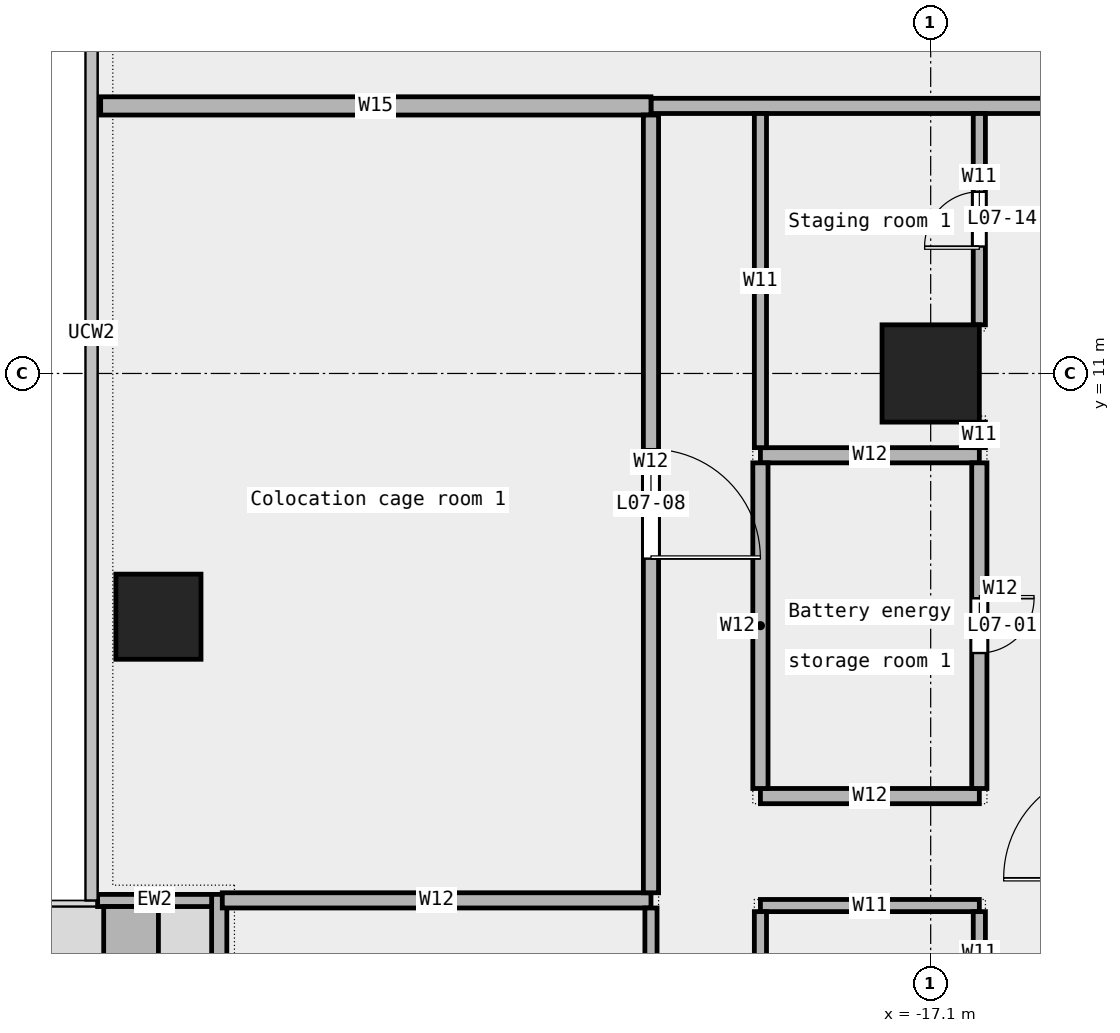
"""IFC4 building model, lengths in metres.
Left out: names, types, materials, properties, quantities, classifications, styles, units other than length and angle.
Written with IfcOpenShell. Run it as: python <this file> out.ifc"""

import sys

from ifc_helpers import new_model, si_unit, direction, frame, frame_2d, origin, origin_2d, place, context, subcontext, project, spatial, rectangle, extrude, element, fill, save


model = new_model("IFC4")
c1 = context("Model", 3, precision=1e-05, world=origin(), true_north=direction((0.0, 1.0)))
c2 = subcontext(c1, "Body", "Model", "MODEL_VIEW")
j1 = project(units=[si_unit("LENGTHUNIT", "METRE"), si_unit("PLANEANGLEUNIT", "RADIAN")], contexts=[c1])
p1 = place(None, origin())
s1 = spatial("IfcSite", under=j1, at=p1, CompositionType="ELEMENT")
p2 = place(p1, origin())
s2 = spatial("IfcBuilding", under=s1, at=p2, CompositionType="ELEMENT")
p3 = place(p2, frame((0.0, 0.0, 40.6)))
s3 = spatial("IfcBuildingStorey", under=s2, at=p3, CompositionType="ELEMENT", Elevation=40.6)
p4 = place(p3, frame((-29.8, 7.0, 0.0), z_axis=(0.0, 0.0, 1.0), x_axis=(1.0, 0.0, 0.0)))
e1 = element("IfcColumn", 1, at=p4, inside=s3, PredefinedType="COLUMN", context=c2, shape_type="SweptSolid", body=[
    extrude(rectangle(XDim=1.4, YDim=1.4, at=origin_2d()), origin(), (0.0, 0.0, 1.0), 4.35),
])
p5 = place(p3, frame((-17.1, 11.0, 0.0), z_axis=(0.0, 0.0, 1.0), x_axis=(1.0, 0.0, 0.0)))
e2 = element("IfcColumn", 2, at=p5, inside=s3, PredefinedType="COLUMN", context=c2, shape_type="SweptSolid", body=[
    extrude(rectangle(XDim=1.6, YDim=1.6, at=origin_2d()), origin(), (0.0, 0.0, 1.0), 4.35),
])
p6 = place(p3, frame((-28.8, 2.433, 0.0), z_axis=(0.0, 0.0, 1.0), x_axis=(0.0, -1.0, 0.0)))
e3 = element("IfcWall", 3, at=p6, inside=s3, PredefinedType="STANDARD", context=c2, shape_type="SweptSolid", body=[
    extrude(rectangle(XDim=14.2, YDim=0.25, at=frame_2d((7.1, 0.0))), origin(), (0.0, 0.0, 1.0), 4.35),
])
p7 = place(p6, frame((1.75, 0.0, 0.45)))
e4 = element("IfcOpeningElement", 4, at=p7, cuts=e3, PredefinedType="OPENING", context=c2, shape_type="SweptSolid", body=[
    extrude(rectangle(XDim=1.5, YDim=3.0, at=frame_2d((0.75, 1.5))), frame((0.0, 0.137, 0.0), z_axis=(0.0, -1.0, 0.0), x_axis=(1.0, 0.0, 0.0)), (0.0, 0.0, 1.0), 0.274),
])
p8 = place(p6, frame((6.25, 0.0, 0.0)))
e5 = element("IfcOpeningElement", 5, at=p8, cuts=e3, PredefinedType="OPENING", context=c2, shape_type="SweptSolid", body=[
    extrude(rectangle(XDim=1.8, YDim=2.4, at=frame_2d((0.9, 1.2))), frame((0.0, 0.137, 0.0), z_axis=(0.0, -1.0, 0.0), x_axis=(1.0, 0.0, 0.0)), (0.0, 0.0, 1.0), 0.274),
])
p9 = place(p6, frame((11.0, 0.0, 0.45)))
e6 = element("IfcOpeningElement", 6, at=p9, cuts=e3, PredefinedType="OPENING", context=c2, shape_type="SweptSolid", body=[
    extrude(rectangle(XDim=1.5, YDim=3.0, at=frame_2d((0.75, 1.5))), frame((0.0, 0.137, 0.0), z_axis=(0.0, -1.0, 0.0), x_axis=(1.0, 0.0, 0.0)), (0.0, 0.0, 1.0), 0.274),
])
p10 = place(p3, frame((-30.8, 2.333, 0.0), z_axis=(0.0, 0.0, 1.0), x_axis=(1.0, 0.0, 0.0)))
e7 = element("IfcWall", 7, at=p10, inside=s3, PredefinedType="STANDARD", context=c2, shape_type="SweptSolid", body=[
    extrude(rectangle(XDim=1.875, YDim=0.2, at=frame_2d((0.938, 0.0))), origin(), (0.0, 0.0, 1.0), 4.35),
])
p11 = place(p3, frame((-30.25, 2.233, 0.0), z_axis=(0.0, 0.0, 1.0), x_axis=(0.0, -1.0, 0.0)))
e8 = element("IfcWall", 8, at=p11, inside=s3, PredefinedType="STANDARD", context=c2, shape_type="SweptSolid", body=[
    extrude(rectangle(XDim=3.6, YDim=0.9, at=frame_2d((1.8, 0.0))), origin(), (0.0, 0.0, 1.0), 0.7),
])
p12 = place(p3, frame((-19.9, 2.25, 0.0), z_axis=(0.0, 0.0, 1.0), x_axis=(1.0, 0.0, 0.0)))
e9 = element("IfcWall", 9, at=p12, inside=s3, PredefinedType="PARTITIONING", context=c2, shape_type="SweptSolid", body=[
    extrude(rectangle(XDim=3.6, YDim=0.2, at=frame_2d((1.8, 0.0))), origin(), (0.0, 0.0, 1.0), 4.35),
])
p13 = place(p3, frame((-28.75, 2.335, 0.0), z_axis=(0.0, 0.0, 1.0), x_axis=(1.0, 0.0, 0.0)))
e10 = element("IfcWall", 10, at=p13, inside=s3, PredefinedType="PARTITIONING", context=c2, shape_type="SweptSolid", body=[
    extrude(rectangle(XDim=7.05, YDim=0.25, at=frame_2d((3.525, 0.0))), origin(), (0.0, 0.0, 1.0), 4.35),
])
for number, where, z_axis, x_axis in (
    (11, (-19.9, 4.05, 0.0), (0.0, 0.0, 1.0), (1.0, 0.0, 0.0)),
    (12, (-19.9, 9.655, 0.0), (0.0, 0.0, 1.0), (1.0, 0.0, 0.0)),
):
    element("IfcWall", number, at=place(p3, frame(where, z_axis=z_axis, x_axis=x_axis)), inside=s3, PredefinedType="PARTITIONING", context=c2, shape_type="SweptSolid", body=[
        extrude(rectangle(XDim=3.6, YDim=0.25, at=frame_2d((1.8, 0.0))), origin(), (0.0, 0.0, 1.0), 4.35),
    ])
p14 = place(p3, frame((-21.7, 15.4, 0.0), z_axis=(0.0, 0.0, 1.0), x_axis=(1.0, 0.0, 0.0)))
e13 = element("IfcWall", 13, at=p14, inside=s3, PredefinedType="PARTITIONING", context=c2, shape_type="SweptSolid", body=[
    extrude(rectangle(XDim=14.935, YDim=0.25, at=frame_2d((7.468, 0.0))), origin(), (0.0, 0.0, 1.0), 4.35),
])
p15 = place(p14, frame((12.775, 0.0, 0.0)))
e14 = element("IfcOpeningElement", 14, at=p15, cuts=e13, PredefinedType="OPENING", context=c2, shape_type="SweptSolid", body=[
    extrude(rectangle(XDim=0.9, YDim=2.1, at=frame_2d((0.45, 1.05))), frame((0.0, 0.137, 0.0), z_axis=(0.0, -1.0, 0.0), x_axis=(1.0, 0.0, 0.0)), (0.0, 0.0, 1.0), 0.274),
])
p16 = place(p14, frame((7.558, 0.0, 0.0)))
e15 = element("IfcOpeningElement", 15, at=p16, cuts=e13, PredefinedType="OPENING", context=c2, shape_type="SweptSolid", body=[
    extrude(rectangle(XDim=1.8, YDim=2.1, at=frame_2d((0.9, 1.05))), frame((0.0, 0.137, 0.0), z_axis=(0.0, -1.0, 0.0), x_axis=(1.0, 0.0, 0.0)), (0.0, 0.0, 1.0), 0.274),
])
p17 = place(p3, frame((-30.75, 15.4, 0.0), z_axis=(0.0, 0.0, 1.0), x_axis=(1.0, 0.0, 0.0)))
e16 = element("IfcWall", 16, at=p17, inside=s3, PredefinedType="PARTITIONING", context=c2, shape_type="SweptSolid", body=[
    extrude(rectangle(XDim=9.05, YDim=0.3, at=frame_2d((4.525, 0.0))), origin(), (0.0, 0.0, 1.0), 4.35),
])
p18 = place(p3, frame((-21.7, -9.0, 0.0), z_axis=(0.0, 0.0, 1.0), x_axis=(0.0, 1.0, 0.0)))
e17 = element("IfcWall", 17, at=p18, inside=s3, PredefinedType="PARTITIONING", context=c2, shape_type="SweptSolid", body=[
    extrude(rectangle(XDim=11.21, YDim=0.2, at=frame_2d((5.605, 0.0))), origin(), (0.0, 0.0, 1.0), 4.35),
])
p19 = place(p18, frame((4.705, 0.0, 0.0)))
e18 = element("IfcOpeningElement", 18, at=p19, cuts=e17, PredefinedType="OPENING", context=c2, shape_type="SweptSolid", body=[
    extrude(rectangle(XDim=1.8, YDim=2.1, at=frame_2d((0.9, 1.05))), frame((0.0, 0.112, 0.0), z_axis=(0.0, -1.0, 0.0), x_axis=(1.0, 0.0, 0.0)), (0.0, 0.0, 1.0), 0.224),
])
p20 = place(p3, frame((-21.7, 2.46, 0.0), z_axis=(0.0, 0.0, 1.0), x_axis=(0.0, 1.0, 0.0)))
e19 = element("IfcWall", 19, at=p20, inside=s3, PredefinedType="PARTITIONING", context=c2, shape_type="SweptSolid", body=[
    extrude(rectangle(XDim=12.79, YDim=0.25, at=frame_2d((6.395, 0.0))), origin(), (0.0, 0.0, 1.0), 4.35),
])
p21 = place(p20, frame((5.495, 0.0, 0.0)))
e20 = element("IfcOpeningElement", 20, at=p21, cuts=e19, PredefinedType="OPENING", context=c2, shape_type="SweptSolid", body=[
    extrude(rectangle(XDim=1.8, YDim=2.1, at=frame_2d((0.9, 1.05))), frame((0.0, 0.137, 0.0), z_axis=(0.0, -1.0, 0.0), x_axis=(1.0, 0.0, 0.0)), (0.0, 0.0, 1.0), 0.274),
])
p22 = place(p3, frame((-19.9, -9.0, 0.0), z_axis=(0.0, 0.0, 1.0), x_axis=(0.0, 1.0, 0.0)))
e21 = element("IfcWall", 21, at=p22, inside=s3, PredefinedType="PARTITIONING", context=c2, shape_type="SweptSolid", body=[
    extrude(rectangle(XDim=11.15, YDim=0.2, at=frame_2d((5.575, 0.0))), origin(), (0.0, 0.0, 1.0), 4.35),
])
p23 = place(p3, frame((-19.9, 9.78, 0.0), z_axis=(0.0, 0.0, 1.0), x_axis=(0.0, 1.0, 0.0)))
e22 = element("IfcWall", 22, at=p23, inside=s3, PredefinedType="PARTITIONING", context=c2, shape_type="SweptSolid", body=[
    extrude(rectangle(XDim=5.495, YDim=0.2, at=frame_2d((2.748, 0.0))), origin(), (0.0, 0.0, 1.0), 4.35),
])
p24 = place(p3, frame((-19.9, 4.175, 0.0), z_axis=(0.0, 0.0, 1.0), x_axis=(0.0, 1.0, 0.0)))
e23 = element("IfcWall", 23, at=p24, inside=s3, PredefinedType="PARTITIONING", context=c2, shape_type="SweptSolid", body=[
    extrude(rectangle(XDim=5.355, YDim=0.25, at=frame_2d((2.677, 0.0))), origin(), (0.0, 0.0, 1.0), 4.35),
])
p25 = place(p3, frame((-16.3, 0.8, 0.0), z_axis=(0.0, 0.0, 1.0), x_axis=(0.0, 1.0, 0.0)))
e24 = element("IfcWall", 24, at=p25, inside=s3, PredefinedType="PARTITIONING", context=c2, shape_type="SweptSolid", body=[
    extrude(rectangle(XDim=1.35, YDim=0.2, at=frame_2d((0.675, 0.0))), origin(), (0.0, 0.0, 1.0), 4.35),
])
p26 = place(p3, frame((-16.3, 9.78, 0.0), z_axis=(0.0, 0.0, 1.0), x_axis=(0.0, 1.0, 0.0)))
e25 = element("IfcWall", 25, at=p26, inside=s3, PredefinedType="PARTITIONING", context=c2, shape_type="SweptSolid", body=[
    extrude(rectangle(XDim=0.42, YDim=0.2, at=frame_2d((0.21, 0.0))), origin(), (0.0, 0.0, 1.0), 4.35),
])
p27 = place(p3, frame((-16.3, 11.8, 0.0), z_axis=(0.0, 0.0, 1.0), x_axis=(0.0, 1.0, 0.0)))
e26 = element("IfcWall", 26, at=p27, inside=s3, PredefinedType="PARTITIONING", context=c2, shape_type="SweptSolid", body=[
    extrude(rectangle(XDim=3.475, YDim=0.2, at=frame_2d((1.737, 0.0))), origin(), (0.0, 0.0, 1.0), 4.35),
])
p28 = place(p27, frame((1.288, 0.0, 0.0)))
e27 = element("IfcOpeningElement", 27, at=p28, cuts=e26, PredefinedType="OPENING", context=c2, shape_type="SweptSolid", body=[
    extrude(rectangle(XDim=0.9, YDim=2.1, at=frame_2d((0.45, 1.05))), frame((0.0, 0.112, 0.0), z_axis=(0.0, -1.0, 0.0), x_axis=(1.0, 0.0, 0.0)), (0.0, 0.0, 1.0), 0.224),
])
p29 = place(p3, frame((-16.3, 4.175, 0.0), z_axis=(0.0, 0.0, 1.0), x_axis=(0.0, 1.0, 0.0)))
e28 = element("IfcWall", 28, at=p29, inside=s3, PredefinedType="PARTITIONING", context=c2, shape_type="SweptSolid", body=[
    extrude(rectangle(XDim=5.355, YDim=0.25, at=frame_2d((2.677, 0.0))), origin(), (0.0, 0.0, 1.0), 4.35),
])
p30 = place(p29, frame((2.228, 0.0, 0.0)))
e29 = element("IfcOpeningElement", 29, at=p30, cuts=e28, PredefinedType="OPENING", context=c2, shape_type="SweptSolid", body=[
    extrude(rectangle(XDim=0.9, YDim=2.1, at=frame_2d((0.45, 1.05))), frame((0.0, 0.137, 0.0), z_axis=(0.0, -1.0, 0.0), x_axis=(1.0, 0.0, 0.0)), (0.0, 0.0, 1.0), 0.274),
])
p31 = place(p30, origin())
e30 = element("IfcDoor", 30, at=p31, inside=s3, OperationType="SINGLE_SWING_LEFT", PredefinedType="DOOR", context=c2, shape_type="SweptSolid", body=[
    extrude(rectangle(XDim=0.9, YDim=2.1, at=frame_2d((0.45, 1.05))), frame((0.0, 0.025, 0.0), z_axis=(0.0, -1.0, 0.0), x_axis=(1.0, 0.0, 0.0)), (0.0, 0.0, 1.0), 0.05),
])
fill(e29, e30)
p32 = place(p21, origin())
e31 = element("IfcDoor", 31, at=p32, inside=s3, OperationType="DOUBLE_DOOR_SINGLE_SWING", PredefinedType="DOOR", context=c2, shape_type="SweptSolid", body=[
    extrude(rectangle(XDim=1.8, YDim=2.1, at=frame_2d((0.9, 1.05))), frame((0.0, 0.025, 0.0), z_axis=(0.0, -1.0, 0.0), x_axis=(1.0, 0.0, 0.0)), (0.0, 0.0, 1.0), 0.05),
])
fill(e20, e31)
p33 = place(p28, origin())
e32 = element("IfcDoor", 32, at=p33, inside=s3, OperationType="SINGLE_SWING_LEFT", PredefinedType="DOOR", context=c2, shape_type="SweptSolid", body=[
    extrude(rectangle(XDim=0.9, YDim=2.1, at=frame_2d((0.45, 1.05))), frame((0.0, 0.025, 0.0), z_axis=(0.0, -1.0, 0.0), x_axis=(1.0, 0.0, 0.0)), (0.0, 0.0, 1.0), 0.05),
])
fill(e27, e32)
save(model, sys.argv[1])
